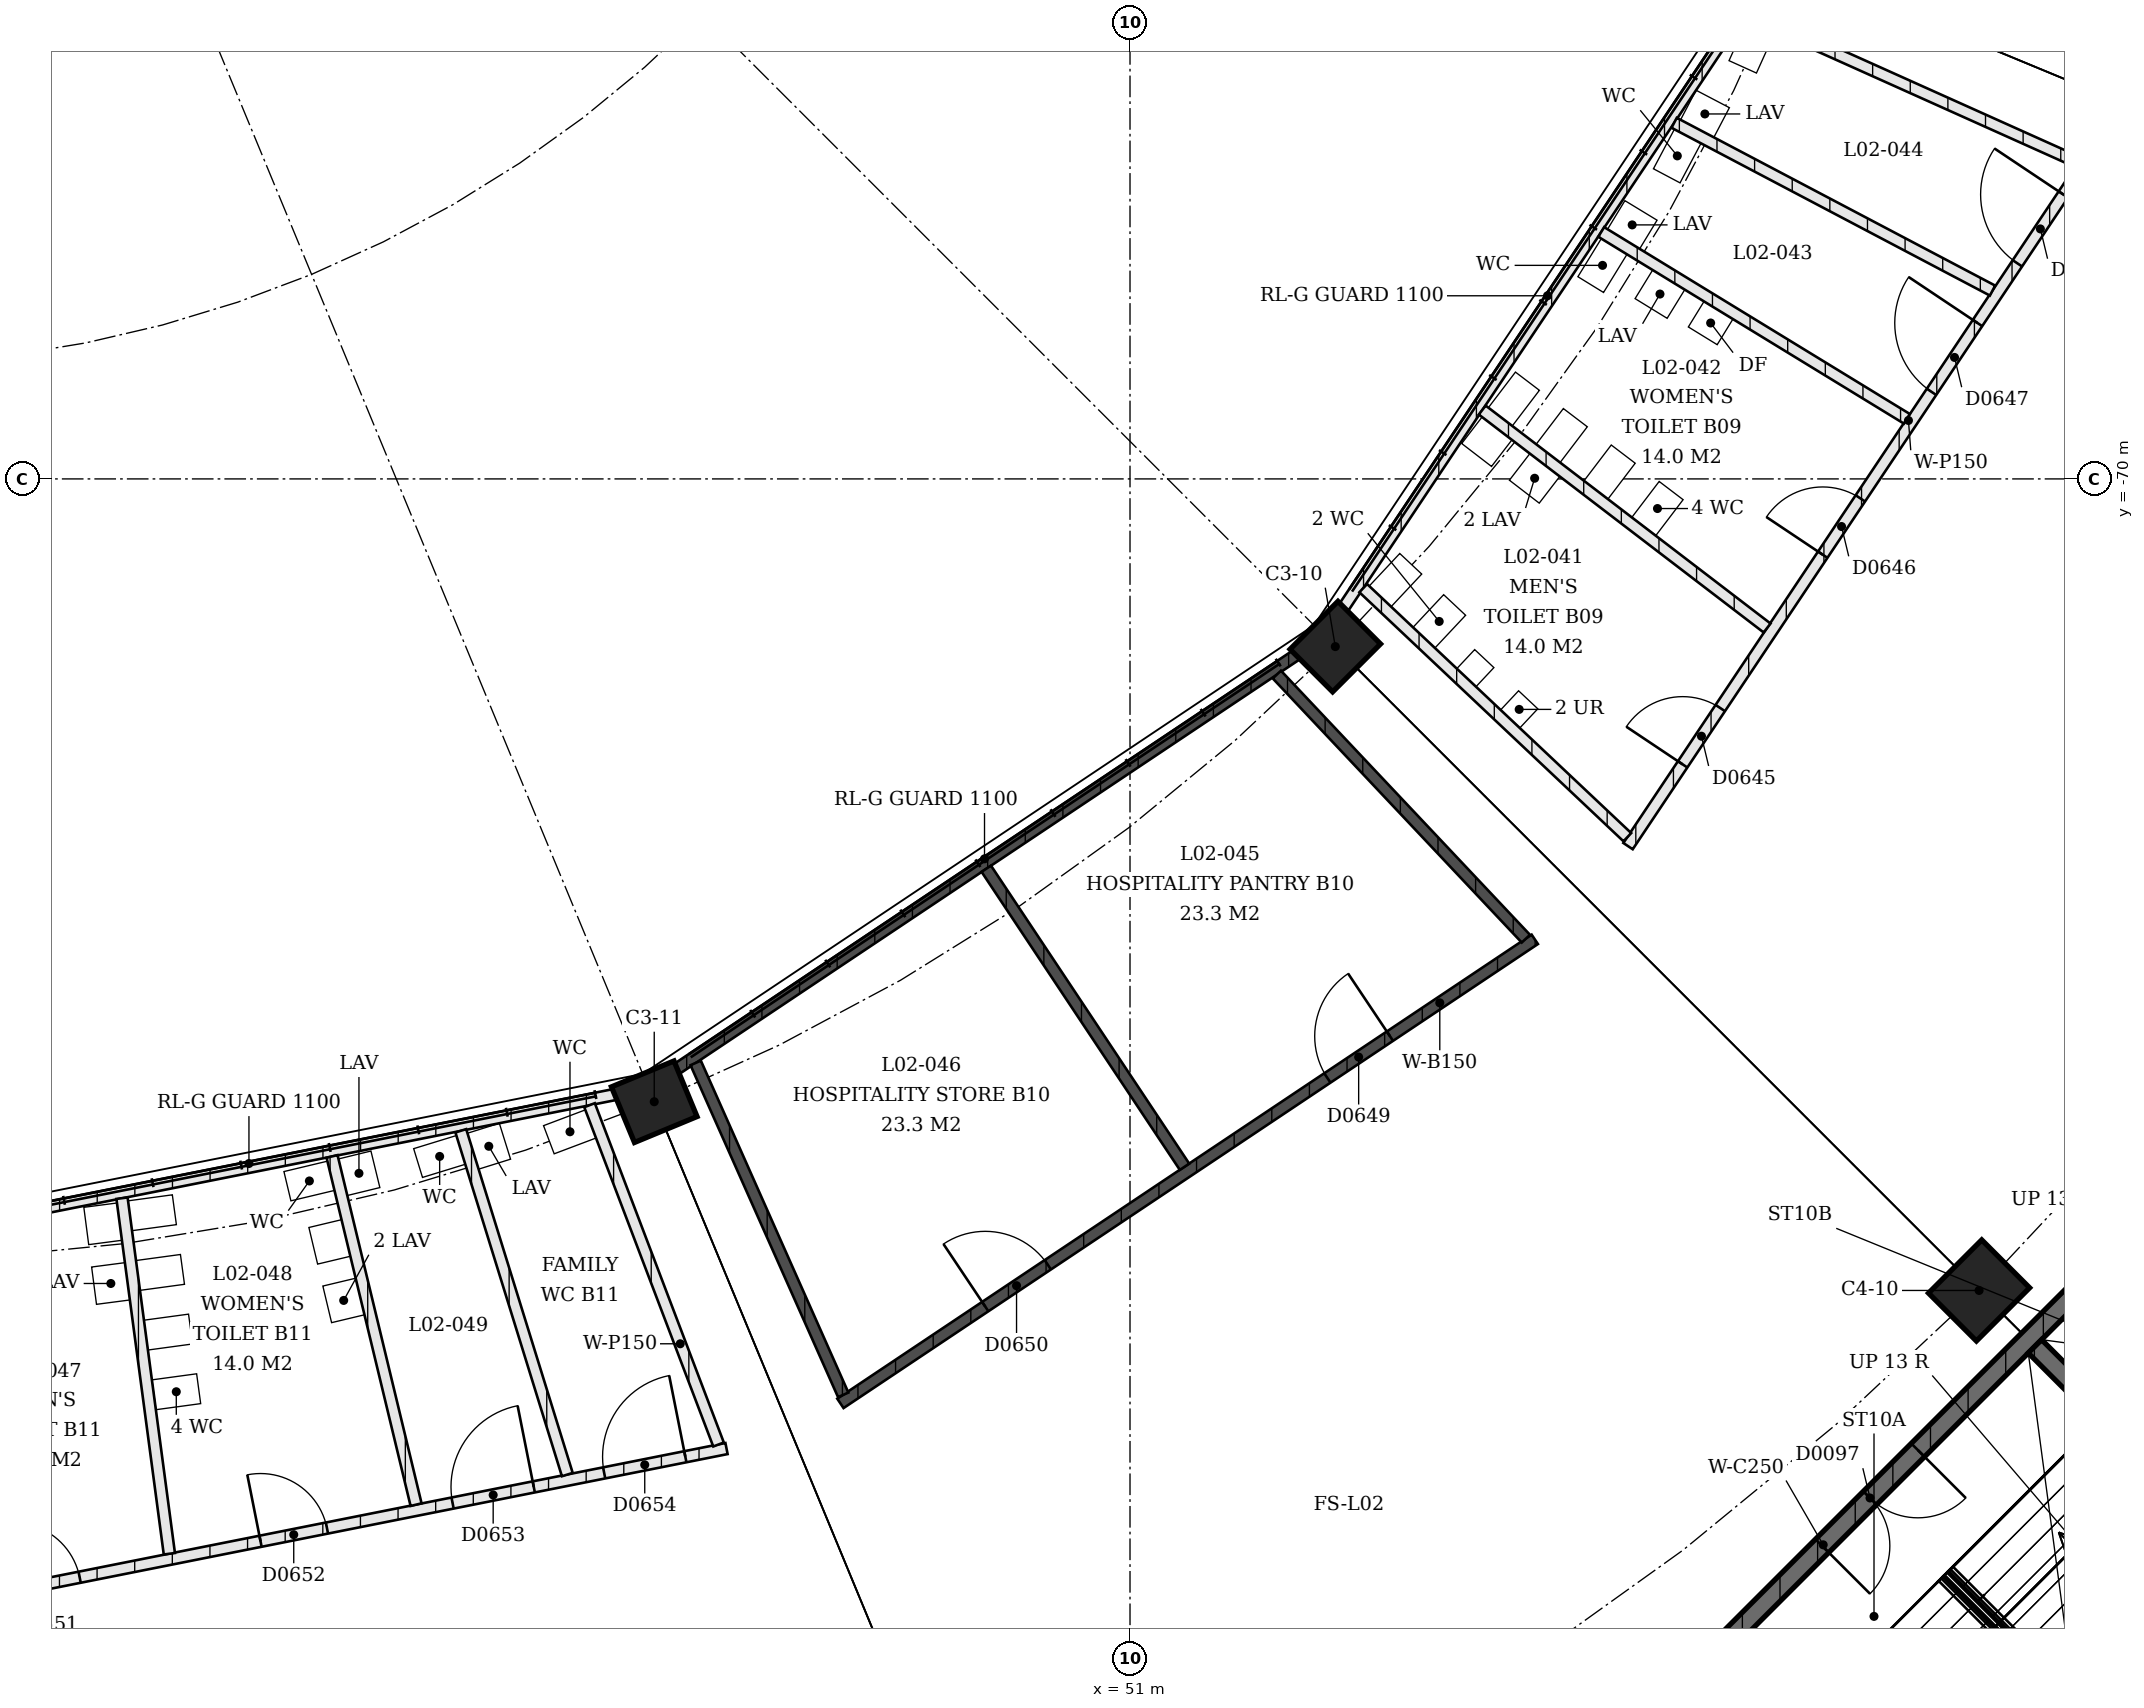
"""IFC4 building model, lengths in metres.
Left out: names, types, materials, properties, quantities, classifications, styles, units other than length and angle.
Written with IfcOpenShell. Run it as: python <this file> out.ifc"""

import sys

from ifc_helpers import new_model, si_unit, direction, frame, frame_2d, origin, origin_2d, place, context, subcontext, project, spatial, rectangle, extrude, element, fill, save


model = new_model("IFC4")
c1 = context("Model", 3, precision=1e-05, world=origin(), true_north=direction((0.0, 1.0)))
c2 = subcontext(c1, "Body", "Model", "MODEL_VIEW")
j1 = project(units=[si_unit("LENGTHUNIT", "METRE"), si_unit("PLANEANGLEUNIT", "RADIAN")], contexts=[c1])
p1 = place(None, origin())
s1 = spatial("IfcSite", under=j1, at=p1, CompositionType="ELEMENT")
p2 = place(p1, origin())
s2 = spatial("IfcBuilding", under=s1, at=p2, CompositionType="ELEMENT")
p3 = place(p2, frame((0.0, 0.0, 9.0)))
s3 = spatial("IfcBuildingStorey", under=s2, at=p3, CompositionType="ELEMENT", Elevation=9.0)
p4 = place(p3, frame((53.728, -72.228, 0.0), z_axis=(0.0, 0.0, 1.0), x_axis=(0.707106781187, 0.707106781187, 0.0)))
e1 = element("IfcColumn", 1, at=p4, inside=s3, PredefinedType="COLUMN", context=c2, shape_type="SweptSolid", body=[
    extrude(rectangle(XDim=0.9, YDim=0.8, at=origin_2d()), origin(), (0.0, 0.0, 1.0), 4.5),
])
p5 = place(p3, frame((62.284, -80.784, 0.0), z_axis=(0.0, 0.0, 1.0), x_axis=(0.707106781187, 0.707106781187, 0.0)))
e2 = element("IfcColumn", 2, at=p5, inside=s3, PredefinedType="COLUMN", context=c2, shape_type="SweptSolid", body=[
    extrude(rectangle(XDim=1.0, YDim=0.9, at=origin_2d()), origin(), (0.0, 0.0, 1.0), 4.5),
])
p6 = place(p3, frame((44.677, -78.276, 0.0), z_axis=(0.0, 0.0, 1.0), x_axis=(0.923879532511, 0.382683432365, 0.0)))
e3 = element("IfcColumn", 3, at=p6, inside=s3, PredefinedType="COLUMN", context=c2, shape_type="SweptSolid", body=[
    extrude(rectangle(XDim=0.9, YDim=0.8, at=origin_2d()), origin(), (0.0, 0.0, 1.0), 4.5),
])
p7 = place(p3, frame((58.643, -85.734, 0.0), z_axis=(0.0, 0.0, 1.0), x_axis=(0.707106781187, 0.707106781187, 0.0)))
e4 = element("IfcWall", 4, at=p7, inside=s3, PredefinedType="SHEAR", context=c2, shape_type="SweptSolid", body=[
    extrude(rectangle(XDim=12.15, YDim=0.25, at=frame_2d((6.075, 0.0))), origin(), (0.0, 0.0, 1.0), 4.09),
])
p8 = place(p7, frame((2.2, 0.0, 0.0)))
e5 = element("IfcOpeningElement", 5, at=p8, cuts=e4, PredefinedType="OPENING", context=c2, shape_type="SweptSolid", body=[
    extrude(rectangle(XDim=1.8, YDim=2.1, at=frame_2d((0.9, 1.05))), frame((0.0, 0.125, 0.0), z_axis=(0.0, -1.0, 0.0), x_axis=(1.0, 0.0, 0.0)), (0.0, 0.0, 1.0), 0.25),
])
p9 = place(p7, frame((8.15, 0.0, 0.0)))
e6 = element("IfcOpeningElement", 6, at=p9, cuts=e4, PredefinedType="OPENING", context=c2, shape_type="SweptSolid", body=[
    extrude(rectangle(XDim=1.8, YDim=2.1, at=frame_2d((0.9, 1.05))), frame((0.0, 0.125, 0.0), z_axis=(0.0, -1.0, 0.0), x_axis=(1.0, 0.0, 0.0)), (0.0, 0.0, 1.0), 0.25),
])
p10 = place(p3, frame((63.027, -81.527, 0.0), z_axis=(0.0, 0.0, 1.0), x_axis=(0.707106781187, -0.707106781187, 0.0)))
e7 = element("IfcWall", 7, at=p10, inside=s3, PredefinedType="SHEAR", context=c2, shape_type="SweptSolid", body=[
    extrude(rectangle(XDim=7.46, YDim=0.25, at=frame_2d((3.73, 0.0))), origin(), (0.0, 0.0, 1.0), 4.09),
])
p11 = place(p3, frame((53.842, -71.705, 0.0), z_axis=(0.0, 0.0, 1.0), x_axis=(0.555582843463, 0.831461186136, 0.0)))
e8 = element("IfcWall", 8, at=p11, inside=s3, PredefinedType="PARTITIONING", context=c2, shape_type="SweptSolid", body=[
    extrude(rectangle(XDim=9.89, YDim=0.15, at=frame_2d((4.945, 0.0))), origin(), (0.0, 0.0, 1.0), 3.0),
])
p12 = place(p3, frame((57.619, -74.88, 0.0), z_axis=(0.0, 0.0, 1.0), x_axis=(0.555577934543, 0.831464466258, 0.0)))
e9 = element("IfcWall", 9, at=p12, inside=s3, PredefinedType="PARTITIONING", context=c2, shape_type="SweptSolid", body=[
    extrude(rectangle(XDim=10.972, YDim=0.15, at=frame_2d((5.486, 0.0))), origin(), (0.0, 0.0, 1.0), 3.0),
])
p13 = place(p12, frame((1.307, 0.0, 0.0)))
e10 = element("IfcOpeningElement", 10, at=p13, cuts=e9, PredefinedType="OPENING", context=c2, shape_type="SweptSolid", body=[
    extrude(rectangle(XDim=0.9, YDim=2.1, at=frame_2d((0.45, 1.05))), frame((0.0, 0.075, 0.0), z_axis=(0.0, -1.0, 0.0), x_axis=(1.0, 0.0, 0.0)), (0.0, 0.0, 1.0), 0.15),
])
p14 = place(p12, frame((4.658, 0.0, 0.0)))
e11 = element("IfcOpeningElement", 11, at=p14, cuts=e9, PredefinedType="OPENING", context=c2, shape_type="SweptSolid", body=[
    extrude(rectangle(XDim=0.9, YDim=2.1, at=frame_2d((0.45, 1.05))), frame((0.0, 0.075, 0.0), z_axis=(0.0, -1.0, 0.0), x_axis=(1.0, 0.0, 0.0)), (0.0, 0.0, 1.0), 0.15),
])
p15 = place(p12, frame((7.26, 0.0, 0.0)))
e12 = element("IfcOpeningElement", 12, at=p15, cuts=e9, PredefinedType="OPENING", context=c2, shape_type="SweptSolid", body=[
    extrude(rectangle(XDim=1.1, YDim=2.1, at=frame_2d((0.55, 1.05))), frame((0.0, 0.075, 0.0), z_axis=(0.0, -1.0, 0.0), x_axis=(1.0, 0.0, 0.0)), (0.0, 0.0, 1.0), 0.15),
])
p16 = place(p12, frame((9.314, 0.0, 0.0)))
e13 = element("IfcOpeningElement", 13, at=p16, cuts=e9, PredefinedType="OPENING", context=c2, shape_type="SweptSolid", body=[
    extrude(rectangle(XDim=1.1, YDim=2.1, at=frame_2d((0.55, 1.05))), frame((0.0, 0.075, 0.0), z_axis=(0.0, -1.0, 0.0), x_axis=(1.0, 0.0, 0.0)), (0.0, 0.0, 1.0), 0.15),
])
p17 = place(p3, frame((54.1, -71.452, 0.0), z_axis=(0.0, 0.0, 1.0), x_axis=(0.727577136184, -0.686025882093, 0.0)))
e14 = element("IfcWall", 14, at=p17, inside=s3, PredefinedType="PARTITIONING", context=c2, shape_type="SweptSolid", body=[
    extrude(rectangle(XDim=4.824, YDim=0.15, at=frame_2d((2.412, 0.0))), origin(), (0.0, 0.0, 1.0), 3.0),
])
p18 = place(p3, frame((55.681, -69.085, 0.0), z_axis=(0.0, 0.0, 1.0), x_axis=(0.794266232117, -0.607569874597, 0.0)))
e15 = element("IfcWall", 15, at=p18, inside=s3, PredefinedType="PARTITIONING", context=c2, shape_type="SweptSolid", body=[
    extrude(rectangle(XDim=4.767, YDim=0.15, at=frame_2d((2.383, 0.0))), origin(), (0.0, 0.0, 1.0), 3.0),
])
p19 = place(p3, frame((57.262, -66.718, 0.0), z_axis=(0.0, 0.0, 1.0), x_axis=(0.8532285882, -0.52153712838, 0.0)))
e16 = element("IfcWall", 16, at=p19, inside=s3, PredefinedType="PARTITIONING", context=c2, shape_type="SweptSolid", body=[
    extrude(rectangle(XDim=4.761, YDim=0.15, at=frame_2d((2.38, 0.0))), origin(), (0.0, 0.0, 1.0), 3.0),
])
p20 = place(p3, frame((58.232, -65.268, 0.0), z_axis=(0.0, 0.0, 1.0), x_axis=(0.884698876091, -0.466162952886, 0.0)))
e17 = element("IfcWall", 17, at=p20, inside=s3, PredefinedType="PARTITIONING", context=c2, shape_type="SweptSolid", body=[
    extrude(rectangle(XDim=4.783, YDim=0.15, at=frame_2d((2.391, 0.0))), origin(), (0.0, 0.0, 1.0), 3.0),
])
p21 = place(p3, frame((59.201, -63.817, 0.0), z_axis=(0.0, 0.0, 1.0), x_axis=(0.912239426779, -0.409657452305, 0.0)))
e18 = element("IfcWall", 18, at=p21, inside=s3, PredefinedType="PARTITIONING", context=c2, shape_type="SweptSolid", body=[
    extrude(rectangle(XDim=4.824, YDim=0.15, at=frame_2d((2.412, 0.0))), origin(), (0.0, 0.0, 1.0), 3.0),
])
p22 = place(p3, frame((53.205, -72.342, 0.0), z_axis=(0.0, 0.0, 1.0), x_axis=(-0.831461186136, -0.555582843463, 0.0)))
e19 = element("IfcWall", 19, at=p22, inside=s3, PredefinedType="SOLIDWALL", context=c2, shape_type="SweptSolid", body=[
    extrude(rectangle(XDim=9.89, YDim=0.15, at=frame_2d((4.945, 0.0))), origin(), (0.0, 0.0, 1.0), 3.0),
])
p23 = place(p3, frame((56.38, -76.119, 0.0), z_axis=(0.0, 0.0, 1.0), x_axis=(-0.831471162003, -0.555567913722, 0.0)))
e20 = element("IfcWall", 20, at=p23, inside=s3, PredefinedType="SOLIDWALL", context=c2, shape_type="SweptSolid", body=[
    extrude(rectangle(XDim=11.099, YDim=0.15, at=frame_2d((5.55, 0.0))), origin(), (0.0, 0.0, 1.0), 3.0),
])
p24 = place(p23, frame((2.315, 0.0, 0.0)))
e21 = element("IfcOpeningElement", 21, at=p24, cuts=e20, PredefinedType="OPENING", context=c2, shape_type="SweptSolid", body=[
    extrude(rectangle(XDim=1.0, YDim=2.1, at=frame_2d((0.5, 1.05))), frame((0.0, 0.075, 0.0), z_axis=(0.0, -1.0, 0.0), x_axis=(1.0, 0.0, 0.0)), (0.0, 0.0, 1.0), 0.15),
])
p25 = place(p23, frame((7.784, 0.0, 0.0)))
e22 = element("IfcOpeningElement", 22, at=p25, cuts=e20, PredefinedType="OPENING", context=c2, shape_type="SweptSolid", body=[
    extrude(rectangle(XDim=1.0, YDim=2.1, at=frame_2d((0.5, 1.05))), frame((0.0, 0.075, 0.0), z_axis=(0.0, -1.0, 0.0), x_axis=(1.0, 0.0, 0.0)), (0.0, 0.0, 1.0), 0.15),
])
p26 = place(p3, frame((52.952, -72.6, 0.0), z_axis=(0.0, 0.0, 1.0), x_axis=(0.686025882093, -0.727577136184, 0.0)))
e23 = element("IfcWall", 23, at=p26, inside=s3, PredefinedType="SOLIDWALL", context=c2, shape_type="SweptSolid", body=[
    extrude(rectangle(XDim=4.824, YDim=0.15, at=frame_2d((2.412, 0.0))), origin(), (0.0, 0.0, 1.0), 3.0),
])
p27 = place(p3, frame((49.09, -75.18, 0.0), z_axis=(0.0, 0.0, 1.0), x_axis=(0.553930112441, -0.832563169093, 0.0)))
e24 = element("IfcWall", 24, at=p27, inside=s3, PredefinedType="SOLIDWALL", context=c2, shape_type="SweptSolid", body=[
    extrude(rectangle(XDim=4.757, YDim=0.15, at=frame_2d((2.378, 0.0))), origin(), (0.0, 0.0, 1.0), 3.0),
])
p28 = place(p3, frame((45.228, -77.761, 0.0), z_axis=(0.0, 0.0, 1.0), x_axis=(0.406147851791, -0.913807377124, 0.0)))
e25 = element("IfcWall", 25, at=p28, inside=s3, PredefinedType="SOLIDWALL", context=c2, shape_type="SweptSolid", body=[
    extrude(rectangle(XDim=4.827, YDim=0.15, at=frame_2d((2.414, 0.0))), origin(), (0.0, 0.0, 1.0), 3.0),
])
p29 = place(p3, frame((34.5, -80.101, 0.0), z_axis=(0.0, 0.0, 1.0), x_axis=(0.980783419557, 0.195099676887, 0.0)))
e26 = element("IfcWall", 26, at=p29, inside=s3, PredefinedType="PARTITIONING", context=c2, shape_type="SweptSolid", body=[
    extrude(rectangle(XDim=9.839, YDim=0.15, at=frame_2d((4.92, 0.0))), origin(), (0.0, 0.0, 1.0), 3.0),
])
p30 = place(p3, frame((34.876, -85.026, 0.0), z_axis=(0.0, 0.0, 1.0), x_axis=(0.980788934186, 0.195071952313, 0.0)))
e27 = element("IfcWall", 27, at=p30, inside=s3, PredefinedType="PARTITIONING", context=c2, shape_type="SweptSolid", body=[
    extrude(rectangle(XDim=10.972, YDim=0.15, at=frame_2d((5.486, 0.0))), origin(), (0.0, 0.0, 1.0), 3.0),
])
p31 = place(p30, frame((1.307, 0.0, 0.0)))
e28 = element("IfcOpeningElement", 28, at=p31, cuts=e27, PredefinedType="OPENING", context=c2, shape_type="SweptSolid", body=[
    extrude(rectangle(XDim=0.9, YDim=2.1, at=frame_2d((0.45, 1.05))), frame((0.0, 0.075, 0.0), z_axis=(0.0, -1.0, 0.0), x_axis=(1.0, 0.0, 0.0)), (0.0, 0.0, 1.0), 0.15),
])
p32 = place(p30, frame((4.658, 0.0, 0.0)))
e29 = element("IfcOpeningElement", 29, at=p32, cuts=e27, PredefinedType="OPENING", context=c2, shape_type="SweptSolid", body=[
    extrude(rectangle(XDim=0.9, YDim=2.1, at=frame_2d((0.45, 1.05))), frame((0.0, 0.075, 0.0), z_axis=(0.0, -1.0, 0.0), x_axis=(1.0, 0.0, 0.0)), (0.0, 0.0, 1.0), 0.15),
])
p33 = place(p30, frame((7.26, 0.0, 0.0)))
e30 = element("IfcOpeningElement", 30, at=p33, cuts=e27, PredefinedType="OPENING", context=c2, shape_type="SweptSolid", body=[
    extrude(rectangle(XDim=1.1, YDim=2.1, at=frame_2d((0.55, 1.05))), frame((0.0, 0.075, 0.0), z_axis=(0.0, -1.0, 0.0), x_axis=(1.0, 0.0, 0.0)), (0.0, 0.0, 1.0), 0.15),
])
p34 = place(p30, frame((9.314, 0.0, 0.0)))
e31 = element("IfcOpeningElement", 31, at=p34, cuts=e27, PredefinedType="OPENING", context=c2, shape_type="SweptSolid", body=[
    extrude(rectangle(XDim=1.1, YDim=2.1, at=frame_2d((0.55, 1.05))), frame((0.0, 0.075, 0.0), z_axis=(0.0, -1.0, 0.0), x_axis=(1.0, 0.0, 0.0)), (0.0, 0.0, 1.0), 0.15),
])
p35 = place(p3, frame((37.604, -79.558, 0.0), z_axis=(0.0, 0.0, 1.0), x_axis=(0.131992613728, -0.991250699834, 0.0)))
e32 = element("IfcWall", 32, at=p35, inside=s3, PredefinedType="PARTITIONING", context=c2, shape_type="SweptSolid", body=[
    extrude(rectangle(XDim=4.767, YDim=0.15, at=frame_2d((2.383, 0.0))), origin(), (0.0, 0.0, 1.0), 3.0),
])
p36 = place(p3, frame((40.395, -79.003, 0.0), z_axis=(0.0, 0.0, 1.0), x_axis=(0.234563667056, -0.972100759231, 0.0)))
e33 = element("IfcWall", 33, at=p36, inside=s3, PredefinedType="PARTITIONING", context=c2, shape_type="SweptSolid", body=[
    extrude(rectangle(XDim=4.761, YDim=0.15, at=frame_2d((2.38, 0.0))), origin(), (0.0, 0.0, 1.0), 3.0),
])
p37 = place(p3, frame((42.106, -78.663, 0.0), z_axis=(0.0, 0.0, 1.0), x_axis=(0.295972093403, -0.955196587058, 0.0)))
e34 = element("IfcWall", 34, at=p37, inside=s3, PredefinedType="PARTITIONING", context=c2, shape_type="SweptSolid", body=[
    extrude(rectangle(XDim=4.783, YDim=0.15, at=frame_2d((2.391, 0.0))), origin(), (0.0, 0.0, 1.0), 3.0),
])
p38 = place(p3, frame((43.817, -78.322, 0.0), z_axis=(0.0, 0.0, 1.0), x_axis=(0.35538492255, -0.934720041951, 0.0)))
e35 = element("IfcWall", 35, at=p38, inside=s3, PredefinedType="PARTITIONING", context=c2, shape_type="SweptSolid", body=[
    extrude(rectangle(XDim=4.824, YDim=0.15, at=frame_2d((2.412, 0.0))), origin(), (0.0, 0.0, 1.0), 3.0),
])
p39 = place(p8, origin())
e36 = element("IfcDoor", 36, at=p39, inside=s3, OperationType="DOUBLE_DOOR_SINGLE_SWING", PredefinedType="DOOR", context=c2, shape_type="SweptSolid", body=[
    extrude(rectangle(XDim=1.8, YDim=2.1, at=frame_2d((0.9, 1.05))), frame((0.0, 0.025, 0.0), z_axis=(0.0, -1.0, 0.0), x_axis=(1.0, 0.0, 0.0)), (0.0, 0.0, 1.0), 0.05),
])
fill(e5, e36)
p40 = place(p13, origin())
e37 = element("IfcDoor", 37, at=p40, inside=s3, OperationType="SINGLE_SWING_RIGHT", PredefinedType="DOOR", context=c2, shape_type="SweptSolid", body=[
    extrude(rectangle(XDim=0.9, YDim=2.1, at=frame_2d((0.45, 1.05))), frame((0.0, 0.025, 0.0), z_axis=(0.0, -1.0, 0.0), x_axis=(1.0, 0.0, 0.0)), (0.0, 0.0, 1.0), 0.05),
])
fill(e10, e37)
p41 = place(p14, origin())
e38 = element("IfcDoor", 38, at=p41, inside=s3, OperationType="SINGLE_SWING_RIGHT", PredefinedType="DOOR", context=c2, shape_type="SweptSolid", body=[
    extrude(rectangle(XDim=0.9, YDim=2.1, at=frame_2d((0.45, 1.05))), frame((0.0, 0.025, 0.0), z_axis=(0.0, -1.0, 0.0), x_axis=(1.0, 0.0, 0.0)), (0.0, 0.0, 1.0), 0.05),
])
fill(e11, e38)
p42 = place(p15, origin())
e39 = element("IfcDoor", 39, at=p42, inside=s3, OperationType="SINGLE_SWING_LEFT", PredefinedType="DOOR", context=c2, shape_type="SweptSolid", body=[
    extrude(rectangle(XDim=1.1, YDim=2.1, at=frame_2d((0.55, 1.05))), frame((0.0, 0.025, 0.0), z_axis=(0.0, -1.0, 0.0), x_axis=(1.0, 0.0, 0.0)), (0.0, 0.0, 1.0), 0.05),
])
fill(e12, e39)
p43 = place(p16, origin())
e40 = element("IfcDoor", 40, at=p43, inside=s3, OperationType="SINGLE_SWING_LEFT", PredefinedType="DOOR", context=c2, shape_type="SweptSolid", body=[
    extrude(rectangle(XDim=1.1, YDim=2.1, at=frame_2d((0.55, 1.05))), frame((0.0, 0.025, 0.0), z_axis=(0.0, -1.0, 0.0), x_axis=(1.0, 0.0, 0.0)), (0.0, 0.0, 1.0), 0.05),
])
fill(e13, e40)
p44 = place(p24, origin())
e41 = element("IfcDoor", 41, at=p44, inside=s3, OperationType="SINGLE_SWING_LEFT", PredefinedType="DOOR", context=c2, shape_type="SweptSolid", body=[
    extrude(rectangle(XDim=1.0, YDim=2.1, at=frame_2d((0.5, 1.05))), frame((0.0, 0.025, 0.0), z_axis=(0.0, -1.0, 0.0), x_axis=(1.0, 0.0, 0.0)), (0.0, 0.0, 1.0), 0.05),
])
fill(e21, e41)
p45 = place(p25, origin())
e42 = element("IfcDoor", 42, at=p45, inside=s3, OperationType="SINGLE_SWING_RIGHT", PredefinedType="DOOR", context=c2, shape_type="SweptSolid", body=[
    extrude(rectangle(XDim=1.0, YDim=2.1, at=frame_2d((0.5, 1.05))), frame((0.0, 0.025, 0.0), z_axis=(0.0, -1.0, 0.0), x_axis=(1.0, 0.0, 0.0)), (0.0, 0.0, 1.0), 0.05),
])
fill(e22, e42)
p46 = place(p31, origin())
e43 = element("IfcDoor", 43, at=p46, inside=s3, OperationType="SINGLE_SWING_RIGHT", PredefinedType="DOOR", context=c2, shape_type="SweptSolid", body=[
    extrude(rectangle(XDim=0.9, YDim=2.1, at=frame_2d((0.45, 1.05))), frame((0.0, 0.025, 0.0), z_axis=(0.0, -1.0, 0.0), x_axis=(1.0, 0.0, 0.0)), (0.0, 0.0, 1.0), 0.05),
])
fill(e28, e43)
p47 = place(p32, origin())
e44 = element("IfcDoor", 44, at=p47, inside=s3, OperationType="SINGLE_SWING_RIGHT", PredefinedType="DOOR", context=c2, shape_type="SweptSolid", body=[
    extrude(rectangle(XDim=0.9, YDim=2.1, at=frame_2d((0.45, 1.05))), frame((0.0, 0.025, 0.0), z_axis=(0.0, -1.0, 0.0), x_axis=(1.0, 0.0, 0.0)), (0.0, 0.0, 1.0), 0.05),
])
fill(e29, e44)
p48 = place(p33, origin())
e45 = element("IfcDoor", 45, at=p48, inside=s3, OperationType="SINGLE_SWING_LEFT", PredefinedType="DOOR", context=c2, shape_type="SweptSolid", body=[
    extrude(rectangle(XDim=1.1, YDim=2.1, at=frame_2d((0.55, 1.05))), frame((0.0, 0.025, 0.0), z_axis=(0.0, -1.0, 0.0), x_axis=(1.0, 0.0, 0.0)), (0.0, 0.0, 1.0), 0.05),
])
fill(e30, e45)
p49 = place(p34, origin())
e46 = element("IfcDoor", 46, at=p49, inside=s3, OperationType="SINGLE_SWING_LEFT", PredefinedType="DOOR", context=c2, shape_type="SweptSolid", body=[
    extrude(rectangle(XDim=1.1, YDim=2.1, at=frame_2d((0.55, 1.05))), frame((0.0, 0.025, 0.0), z_axis=(0.0, -1.0, 0.0), x_axis=(1.0, 0.0, 0.0)), (0.0, 0.0, 1.0), 0.05),
])
fill(e31, e46)
save(model, sys.argv[1])
